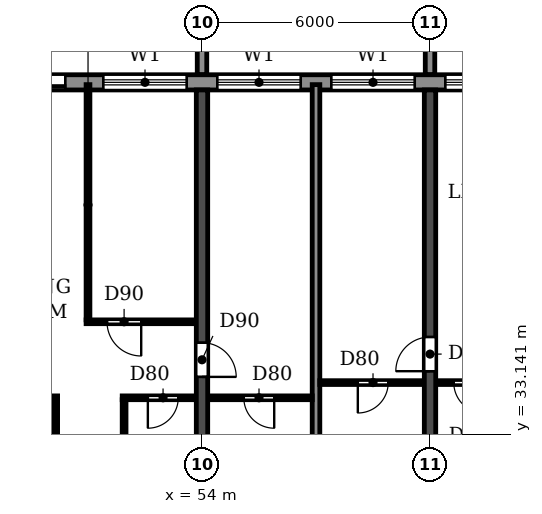
"""IFC4 building model, lengths in metres.
Left out: names, types, materials, properties, quantities, classifications, styles, units other than length and angle.
Written with IfcOpenShell. Run it as: python <this file> out.ifc"""

import sys

from ifc_helpers import new_model, si_unit, direction, frame, frame_2d, origin, place, context, subcontext, project, spatial, polyline, rectangle, outline, extrude, source, transform, mapped, element, fill, save


model = new_model("IFC4")
c1 = context("Model", 3, precision=1e-05, world=origin(), true_north=direction((0.0, 1.0)))
c2 = subcontext(c1, "Body", "Model", "MODEL_VIEW")
j1 = project(units=[si_unit("LENGTHUNIT", "METRE"), si_unit("PLANEANGLEUNIT", "RADIAN")], contexts=[c1])
p1 = place(None, origin())
s1 = spatial("IfcSite", under=j1, at=p1, CompositionType="ELEMENT")
p2 = place(p1, origin())
s2 = spatial("IfcBuilding", under=s1, at=p2, CompositionType="ELEMENT")
p3 = place(p2, frame((0.0, 0.0, 125.7)))
s3 = spatial("IfcBuildingStorey", under=s2, at=p3, CompositionType="ELEMENT", Elevation=125.7)
p4 = place(p3, frame((54.0, 30.525, 0.0), z_axis=(0.0, 0.0, 1.0), x_axis=(0.0, 1.0, 0.0)))
e1 = element("IfcWall", 1, at=p4, inside=s3, PredefinedType="SHEAR", context=c2, shape_type="SweptSolid", body=[
    extrude(rectangle(XDim=11.675, YDim=0.3, at=frame_2d((5.837, 0.0))), origin(), (0.0, 0.0, 1.0), 3.07),
])
p5 = place(p4, frame((4.125, 0.0, 0.0)))
e2 = element("IfcOpeningElement", 2, at=p5, cuts=e1, PredefinedType="OPENING", context=c2, shape_type="SweptSolid", body=[
    extrude(rectangle(XDim=0.9, YDim=2.1, at=frame_2d((0.45, 1.05))), frame((0.0, 0.16, 0.0), z_axis=(0.0, -1.0, 0.0), x_axis=(1.0, 0.0, 0.0)), (0.0, 0.0, 1.0), 0.32),
])
p6 = place(p3, frame((60.0, 30.525, 0.0), z_axis=(0.0, 0.0, 1.0), x_axis=(0.0, 1.0, 0.0)))
e3 = element("IfcWall", 3, at=p6, inside=s3, PredefinedType="SHEAR", context=c2, shape_type="SweptSolid", body=[
    extrude(rectangle(XDim=11.675, YDim=0.3, at=frame_2d((5.837, 0.0))), origin(), (0.0, 0.0, 1.0), 3.07),
])
p7 = place(p6, frame((4.275, 0.0, 0.0)))
e4 = element("IfcOpeningElement", 4, at=p7, cuts=e3, PredefinedType="OPENING", context=c2, shape_type="SweptSolid", body=[
    extrude(rectangle(XDim=0.9, YDim=2.1, at=frame_2d((0.45, 1.05))), frame((0.0, 0.16, 0.0), z_axis=(0.0, -1.0, 0.0), x_axis=(1.0, 0.0, 0.0)), (0.0, 0.0, 1.0), 0.32),
])
p8 = place(p3, frame((85.317, 42.4, 0.0), z_axis=(0.0, 0.0, 1.0), x_axis=(-1.0, 0.0, 0.0)))
e5 = element("IfcWall", 5, at=p8, inside=s3, PredefinedType="STANDARD", context=c2, shape_type="SweptSolid", body=[
    extrude(rectangle(XDim=68.634, YDim=0.4, at=frame_2d((34.317, 0.0))), origin(), (0.0, 0.0, 1.0), 3.07),
])
p9 = place(p8, frame((64.717, 0.0, 0.9)))
e6 = element("IfcOpeningElement", 6, at=p9, cuts=e5, PredefinedType="OPENING", context=c2, shape_type="SweptSolid", body=[
    extrude(rectangle(XDim=2.2, YDim=1.5, at=frame_2d((1.1, 0.75))), frame((0.0, 0.21, 0.0), z_axis=(0.0, -1.0, 0.0), x_axis=(1.0, 0.0, 0.0)), (0.0, 0.0, 1.0), 0.42),
])
p10 = place(p8, frame((61.917, 0.0, 0.0)))
e7 = element("IfcOpeningElement", 7, at=p10, cuts=e5, PredefinedType="OPENING", context=c2, shape_type="SweptSolid", body=[
    extrude(rectangle(XDim=1.8, YDim=2.4, at=frame_2d((0.9, 1.2))), frame((0.0, 0.21, 0.0), z_axis=(0.0, -1.0, 0.0), x_axis=(1.0, 0.0, 0.0)), (0.0, 0.0, 1.0), 0.42),
])
p11 = place(p8, frame((58.717, 0.0, 0.9)))
e8 = element("IfcOpeningElement", 8, at=p11, cuts=e5, PredefinedType="OPENING", context=c2, shape_type="SweptSolid", body=[
    extrude(rectangle(XDim=2.2, YDim=1.5, at=frame_2d((1.1, 0.75))), frame((0.0, 0.21, 0.0), z_axis=(0.0, -1.0, 0.0), x_axis=(1.0, 0.0, 0.0)), (0.0, 0.0, 1.0), 0.42),
])
p12 = place(p8, frame((55.917, 0.0, 0.0)))
e9 = element("IfcOpeningElement", 9, at=p12, cuts=e5, PredefinedType="OPENING", context=c2, shape_type="SweptSolid", body=[
    extrude(rectangle(XDim=1.8, YDim=2.4, at=frame_2d((0.9, 1.2))), frame((0.0, 0.21, 0.0), z_axis=(0.0, -1.0, 0.0), x_axis=(1.0, 0.0, 0.0)), (0.0, 0.0, 1.0), 0.42),
])
p13 = place(p8, frame((52.717, 0.0, 0.9)))
e10 = element("IfcOpeningElement", 10, at=p13, cuts=e5, PredefinedType="OPENING", context=c2, shape_type="SweptSolid", body=[
    extrude(rectangle(XDim=2.2, YDim=1.5, at=frame_2d((1.1, 0.75))), frame((0.0, 0.21, 0.0), z_axis=(0.0, -1.0, 0.0), x_axis=(1.0, 0.0, 0.0)), (0.0, 0.0, 1.0), 0.42),
])
p14 = place(p8, frame((49.917, 0.0, 0.0)))
e11 = element("IfcOpeningElement", 11, at=p14, cuts=e5, PredefinedType="OPENING", context=c2, shape_type="SweptSolid", body=[
    extrude(rectangle(XDim=1.8, YDim=2.4, at=frame_2d((0.9, 1.2))), frame((0.0, 0.21, 0.0), z_axis=(0.0, -1.0, 0.0), x_axis=(1.0, 0.0, 0.0)), (0.0, 0.0, 1.0), 0.42),
])
p15 = place(p8, frame((46.717, 0.0, 0.9)))
e12 = element("IfcOpeningElement", 12, at=p15, cuts=e5, PredefinedType="OPENING", context=c2, shape_type="SweptSolid", body=[
    extrude(rectangle(XDim=2.2, YDim=1.5, at=frame_2d((1.1, 0.75))), frame((0.0, 0.21, 0.0), z_axis=(0.0, -1.0, 0.0), x_axis=(1.0, 0.0, 0.0)), (0.0, 0.0, 1.0), 0.42),
])
p16 = place(p8, frame((43.917, 0.0, 0.0)))
e13 = element("IfcOpeningElement", 13, at=p16, cuts=e5, PredefinedType="OPENING", context=c2, shape_type="SweptSolid", body=[
    extrude(rectangle(XDim=1.8, YDim=2.4, at=frame_2d((0.9, 1.2))), frame((0.0, 0.21, 0.0), z_axis=(0.0, -1.0, 0.0), x_axis=(1.0, 0.0, 0.0)), (0.0, 0.0, 1.0), 0.42),
])
p17 = place(p8, frame((40.717, 0.0, 0.9)))
e14 = element("IfcOpeningElement", 14, at=p17, cuts=e5, PredefinedType="OPENING", context=c2, shape_type="SweptSolid", body=[
    extrude(rectangle(XDim=2.2, YDim=1.5, at=frame_2d((1.1, 0.75))), frame((0.0, 0.21, 0.0), z_axis=(0.0, -1.0, 0.0), x_axis=(1.0, 0.0, 0.0)), (0.0, 0.0, 1.0), 0.42),
])
p18 = place(p8, frame((37.717, 0.0, 0.9)))
e15 = element("IfcOpeningElement", 15, at=p18, cuts=e5, PredefinedType="OPENING", context=c2, shape_type="SweptSolid", body=[
    extrude(rectangle(XDim=2.2, YDim=1.5, at=frame_2d((1.1, 0.75))), frame((0.0, 0.21, 0.0), z_axis=(0.0, -1.0, 0.0), x_axis=(1.0, 0.0, 0.0)), (0.0, 0.0, 1.0), 0.42),
])
p19 = place(p8, frame((34.917, 0.0, 0.0)))
e16 = element("IfcOpeningElement", 16, at=p19, cuts=e5, PredefinedType="OPENING", context=c2, shape_type="SweptSolid", body=[
    extrude(rectangle(XDim=1.8, YDim=2.4, at=frame_2d((0.9, 1.2))), frame((0.0, 0.21, 0.0), z_axis=(0.0, -1.0, 0.0), x_axis=(1.0, 0.0, 0.0)), (0.0, 0.0, 1.0), 0.42),
])
p20 = place(p8, frame((31.717, 0.0, 0.9)))
e17 = element("IfcOpeningElement", 17, at=p20, cuts=e5, PredefinedType="OPENING", context=c2, shape_type="SweptSolid", body=[
    extrude(rectangle(XDim=2.2, YDim=1.5, at=frame_2d((1.1, 0.75))), frame((0.0, 0.21, 0.0), z_axis=(0.0, -1.0, 0.0), x_axis=(1.0, 0.0, 0.0)), (0.0, 0.0, 1.0), 0.42),
])
p21 = place(p8, frame((28.717, 0.0, 0.9)))
e18 = element("IfcOpeningElement", 18, at=p21, cuts=e5, PredefinedType="OPENING", context=c2, shape_type="SweptSolid", body=[
    extrude(rectangle(XDim=2.2, YDim=1.5, at=frame_2d((1.1, 0.75))), frame((0.0, 0.21, 0.0), z_axis=(0.0, -1.0, 0.0), x_axis=(1.0, 0.0, 0.0)), (0.0, 0.0, 1.0), 0.42),
])
p22 = place(p8, frame((25.717, 0.0, 0.9)))
e19 = element("IfcOpeningElement", 19, at=p22, cuts=e5, PredefinedType="OPENING", context=c2, shape_type="SweptSolid", body=[
    extrude(rectangle(XDim=2.2, YDim=1.5, at=frame_2d((1.1, 0.75))), frame((0.0, 0.21, 0.0), z_axis=(0.0, -1.0, 0.0), x_axis=(1.0, 0.0, 0.0)), (0.0, 0.0, 1.0), 0.42),
])
p23 = place(p8, frame((22.717, 0.0, 0.9)))
e20 = element("IfcOpeningElement", 20, at=p23, cuts=e5, PredefinedType="OPENING", context=c2, shape_type="SweptSolid", body=[
    extrude(rectangle(XDim=2.2, YDim=1.5, at=frame_2d((1.1, 0.75))), frame((0.0, 0.21, 0.0), z_axis=(0.0, -1.0, 0.0), x_axis=(1.0, 0.0, 0.0)), (0.0, 0.0, 1.0), 0.42),
])
p24 = place(p8, frame((19.917, 0.0, 0.0)))
e21 = element("IfcOpeningElement", 21, at=p24, cuts=e5, PredefinedType="OPENING", context=c2, shape_type="SweptSolid", body=[
    extrude(rectangle(XDim=1.8, YDim=2.4, at=frame_2d((0.9, 1.2))), frame((0.0, 0.21, 0.0), z_axis=(0.0, -1.0, 0.0), x_axis=(1.0, 0.0, 0.0)), (0.0, 0.0, 1.0), 0.42),
])
p25 = place(p8, frame((16.917, 0.0, 0.0)))
e22 = element("IfcOpeningElement", 22, at=p25, cuts=e5, PredefinedType="OPENING", context=c2, shape_type="SweptSolid", body=[
    extrude(rectangle(XDim=1.8, YDim=2.4, at=frame_2d((0.9, 1.2))), frame((0.0, 0.21, 0.0), z_axis=(0.0, -1.0, 0.0), x_axis=(1.0, 0.0, 0.0)), (0.0, 0.0, 1.0), 0.42),
])
p26 = place(p8, frame((13.717, 0.0, 0.9)))
e23 = element("IfcOpeningElement", 23, at=p26, cuts=e5, PredefinedType="OPENING", context=c2, shape_type="SweptSolid", body=[
    extrude(rectangle(XDim=2.2, YDim=1.5, at=frame_2d((1.1, 0.75))), frame((0.0, 0.21, 0.0), z_axis=(0.0, -1.0, 0.0), x_axis=(1.0, 0.0, 0.0)), (0.0, 0.0, 1.0), 0.42),
])
p27 = place(p8, frame((10.717, 0.0, 0.9)))
e24 = element("IfcOpeningElement", 24, at=p27, cuts=e5, PredefinedType="OPENING", context=c2, shape_type="SweptSolid", body=[
    extrude(rectangle(XDim=2.2, YDim=1.5, at=frame_2d((1.1, 0.75))), frame((0.0, 0.21, 0.0), z_axis=(0.0, -1.0, 0.0), x_axis=(1.0, 0.0, 0.0)), (0.0, 0.0, 1.0), 0.42),
])
p28 = place(p8, frame((7.717, 0.0, 0.9)))
e25 = element("IfcOpeningElement", 25, at=p28, cuts=e5, PredefinedType="OPENING", context=c2, shape_type="SweptSolid", body=[
    extrude(rectangle(XDim=2.2, YDim=1.5, at=frame_2d((1.1, 0.75))), frame((0.0, 0.21, 0.0), z_axis=(0.0, -1.0, 0.0), x_axis=(1.0, 0.0, 0.0)), (0.0, 0.0, 1.0), 0.42),
])
p29 = place(p8, frame((4.917, 0.0, 0.0)))
e26 = element("IfcOpeningElement", 26, at=p29, cuts=e5, PredefinedType="OPENING", context=c2, shape_type="SweptSolid", body=[
    extrude(rectangle(XDim=1.8, YDim=2.4, at=frame_2d((0.9, 1.2))), frame((0.0, 0.21, 0.0), z_axis=(0.0, -1.0, 0.0), x_axis=(1.0, 0.0, 0.0)), (0.0, 0.0, 1.0), 0.42),
])
p30 = place(p8, frame((1.717, 0.0, 0.9)))
e27 = element("IfcOpeningElement", 27, at=p30, cuts=e5, PredefinedType="OPENING", context=c2, shape_type="SweptSolid", body=[
    extrude(rectangle(XDim=2.2, YDim=1.5, at=frame_2d((1.1, 0.75))), frame((0.0, 0.21, 0.0), z_axis=(0.0, -1.0, 0.0), x_axis=(1.0, 0.0, 0.0)), (0.0, 0.0, 1.0), 0.42),
])
m1 = source(origin(), c2, "Body", "SweptSolid", [
    extrude(outline(polyline([(0.0, 0.0), (0.25, 0.0), (0.25, 3.1), (0.0, 3.1), (0.0, 0.0)])), origin(), (0.0, 0.0, 1.0), 3.1),
])
for number, where in (
    (28, (53.875, 42.6, 0.0)),
    (29, (59.875, 42.6, 0.0)),
):
    element("IfcWall", number, at=place(p3, frame(where)), inside=s3, PredefinedType="STANDARD", context=c2, shape_type="MappedRepresentation", body=[
        mapped(m1, transform((0.0, 0.0, 0.0))),
    ])
p31 = place(p3, frame((57.0, 30.535, 0.0), z_axis=(0.0, 0.0, 1.0), x_axis=(0.0, 1.0, 0.0)))
e30 = element("IfcWall", 30, at=p31, inside=s3, PredefinedType="PARTITIONING", context=c2, shape_type="SweptSolid", body=[
    extrude(rectangle(XDim=11.805, YDim=0.2, at=frame_2d((5.903, 0.0))), origin(), (0.0, 0.0, 1.0), 3.07),
])
p32 = place(p3, frame((48.16, 34.1, 0.0), z_axis=(0.0, 0.0, 1.0), x_axis=(1.0, 0.0, 0.0)))
e31 = element("IfcWall", 31, at=p32, inside=s3, PredefinedType="PARTITIONING", context=c2, shape_type="SweptSolid", body=[
    extrude(rectangle(XDim=2.04, YDim=0.1, at=frame_2d((1.02, 0.0))), origin(), (0.0, 0.0, 1.0), 3.07),
])
p33 = place(p32, frame((0.465, 0.0, 0.0)))
e32 = element("IfcOpeningElement", 32, at=p33, cuts=e31, PredefinedType="OPENING", context=c2, shape_type="SweptSolid", body=[
    extrude(rectangle(XDim=0.9, YDim=2.1, at=frame_2d((0.45, 1.05))), frame((0.0, 0.06, 0.0), z_axis=(0.0, -1.0, 0.0), x_axis=(1.0, 0.0, 0.0)), (0.0, 0.0, 1.0), 0.12),
])
p34 = place(p3, frame((51.9, 34.1, 0.0), z_axis=(0.0, 0.0, 1.0), x_axis=(1.0, 0.0, 0.0)))
e33 = element("IfcWall", 33, at=p34, inside=s3, PredefinedType="PARTITIONING", context=c2, shape_type="SweptSolid", body=[
    extrude(rectangle(XDim=1.94, YDim=0.1, at=frame_2d((0.97, 0.0))), origin(), (0.0, 0.0, 1.0), 3.07),
])
p35 = place(p34, frame((0.675, 0.0, 0.0)))
e34 = element("IfcOpeningElement", 34, at=p35, cuts=e33, PredefinedType="OPENING", context=c2, shape_type="SweptSolid", body=[
    extrude(rectangle(XDim=0.8, YDim=2.1, at=frame_2d((0.4, 1.05))), frame((0.0, 0.06, 0.0), z_axis=(0.0, -1.0, 0.0), x_axis=(1.0, 0.0, 0.0)), (0.0, 0.0, 1.0), 0.12),
])
p36 = place(p3, frame((54.16, 34.1, 0.0), z_axis=(0.0, 0.0, 1.0), x_axis=(1.0, 0.0, 0.0)))
e35 = element("IfcWall", 35, at=p36, inside=s3, PredefinedType="PARTITIONING", context=c2, shape_type="SweptSolid", body=[
    extrude(rectangle(XDim=2.74, YDim=0.1, at=frame_2d((1.37, 0.0))), origin(), (0.0, 0.0, 1.0), 3.07),
])
p37 = place(p36, frame((0.94, 0.0, 0.0)))
e36 = element("IfcOpeningElement", 36, at=p37, cuts=e35, PredefinedType="OPENING", context=c2, shape_type="SweptSolid", body=[
    extrude(rectangle(XDim=0.8, YDim=2.1, at=frame_2d((0.4, 1.05))), frame((0.0, 0.06, 0.0), z_axis=(0.0, -1.0, 0.0), x_axis=(1.0, 0.0, 0.0)), (0.0, 0.0, 1.0), 0.12),
])
p38 = place(p3, frame((57.1, 34.5, 0.0), z_axis=(0.0, 0.0, 1.0), x_axis=(1.0, 0.0, 0.0)))
e37 = element("IfcWall", 37, at=p38, inside=s3, PredefinedType="PARTITIONING", context=c2, shape_type="SweptSolid", body=[
    extrude(rectangle(XDim=2.74, YDim=0.1, at=frame_2d((1.37, 0.0))), origin(), (0.0, 0.0, 1.0), 3.07),
])
p39 = place(p38, frame((1.0, 0.0, 0.0)))
e38 = element("IfcOpeningElement", 38, at=p39, cuts=e37, PredefinedType="OPENING", context=c2, shape_type="SweptSolid", body=[
    extrude(rectangle(XDim=0.8, YDim=2.1, at=frame_2d((0.4, 1.05))), frame((0.0, 0.06, 0.0), z_axis=(0.0, -1.0, 0.0), x_axis=(1.0, 0.0, 0.0)), (0.0, 0.0, 1.0), 0.12),
])
p40 = place(p3, frame((60.16, 34.5, 0.0), z_axis=(0.0, 0.0, 1.0), x_axis=(1.0, 0.0, 0.0)))
e39 = element("IfcWall", 39, at=p40, inside=s3, PredefinedType="PARTITIONING", context=c2, shape_type="SweptSolid", body=[
    extrude(rectangle(XDim=1.94, YDim=0.1, at=frame_2d((0.97, 0.0))), origin(), (0.0, 0.0, 1.0), 3.07),
])
p41 = place(p40, frame((0.465, 0.0, 0.0)))
e40 = element("IfcOpeningElement", 40, at=p41, cuts=e39, PredefinedType="OPENING", context=c2, shape_type="SweptSolid", body=[
    extrude(rectangle(XDim=0.8, YDim=2.1, at=frame_2d((0.4, 1.05))), frame((0.0, 0.06, 0.0), z_axis=(0.0, -1.0, 0.0), x_axis=(1.0, 0.0, 0.0)), (0.0, 0.0, 1.0), 0.12),
])
p42 = place(p3, frame((50.95, 36.1, 0.0), z_axis=(0.0, 0.0, 1.0), x_axis=(1.0, 0.0, 0.0)))
e41 = element("IfcWall", 41, at=p42, inside=s3, PredefinedType="PARTITIONING", context=c2, shape_type="SweptSolid", body=[
    extrude(rectangle(XDim=2.89, YDim=0.1, at=frame_2d((1.445, 0.0))), origin(), (0.0, 0.0, 1.0), 3.07),
])
p43 = place(p42, frame((0.55, 0.0, 0.0)))
e42 = element("IfcOpeningElement", 42, at=p43, cuts=e41, PredefinedType="OPENING", context=c2, shape_type="SweptSolid", body=[
    extrude(rectangle(XDim=0.9, YDim=2.1, at=frame_2d((0.45, 1.05))), frame((0.0, 0.06, 0.0), z_axis=(0.0, -1.0, 0.0), x_axis=(1.0, 0.0, 0.0)), (0.0, 0.0, 1.0), 0.12),
])
p44 = place(p3, frame((50.15, 30.535, 0.0), z_axis=(0.0, 0.0, 1.0), x_axis=(0.0, 1.0, 0.0)))
e43 = element("IfcWall", 43, at=p44, inside=s3, PredefinedType="PARTITIONING", context=c2, shape_type="SweptSolid", body=[
    extrude(rectangle(XDim=3.515, YDim=0.1, at=frame_2d((1.758, 0.0))), origin(), (0.0, 0.0, 1.0), 3.07),
])
p45 = place(p3, frame((51.0, 36.15, 0.0), z_axis=(0.0, 0.0, 1.0), x_axis=(0.0, 1.0, 0.0)))
e44 = element("IfcWall", 44, at=p45, inside=s3, PredefinedType="PARTITIONING", context=c2, shape_type="SweptSolid", body=[
    extrude(rectangle(XDim=6.19, YDim=0.1, at=frame_2d((3.095, 0.0))), origin(), (0.0, 0.0, 1.0), 3.07),
])
p46 = place(p3, frame((51.95, 30.535, 0.0), z_axis=(0.0, 0.0, 1.0), x_axis=(0.0, 1.0, 0.0)))
e45 = element("IfcWall", 45, at=p46, inside=s3, PredefinedType="PARTITIONING", context=c2, shape_type="SweptSolid", body=[
    extrude(rectangle(XDim=3.515, YDim=0.1, at=frame_2d((1.758, 0.0))), origin(), (0.0, 0.0, 1.0), 3.07),
])
p47 = place(p19, origin())
e46 = element("IfcDoor", 46, at=p47, inside=s3, OperationType="DOUBLE_DOOR_SLIDING", PredefinedType="DOOR", context=c2, shape_type="SweptSolid", body=[
    extrude(rectangle(XDim=1.8, YDim=2.4, at=frame_2d((0.9, 1.2))), frame((0.0, 0.025, 0.0), z_axis=(0.0, -1.0, 0.0), x_axis=(1.0, 0.0, 0.0)), (0.0, 0.0, 1.0), 0.05),
])
fill(e16, e46)
p48 = place(p20, origin())
e47 = element("IfcWindow", 47, at=p48, inside=s3, PartitioningType="DOUBLE_PANEL_HORIZONTAL", PredefinedType="WINDOW", context=c2, shape_type="SweptSolid", body=[
    extrude(rectangle(XDim=2.2, YDim=1.5, at=frame_2d((1.1, 0.75))), frame((0.0, 0.03, 0.0), z_axis=(0.0, -1.0, 0.0), x_axis=(1.0, 0.0, 0.0)), (0.0, 0.0, 1.0), 0.06),
])
fill(e17, e47)
p49 = place(p21, origin())
e48 = element("IfcWindow", 48, at=p49, inside=s3, PartitioningType="DOUBLE_PANEL_HORIZONTAL", PredefinedType="WINDOW", context=c2, shape_type="SweptSolid", body=[
    extrude(rectangle(XDim=2.2, YDim=1.5, at=frame_2d((1.1, 0.75))), frame((0.0, 0.03, 0.0), z_axis=(0.0, -1.0, 0.0), x_axis=(1.0, 0.0, 0.0)), (0.0, 0.0, 1.0), 0.06),
])
fill(e18, e48)
p50 = place(p22, origin())
e49 = element("IfcWindow", 49, at=p50, inside=s3, PartitioningType="DOUBLE_PANEL_HORIZONTAL", PredefinedType="WINDOW", context=c2, shape_type="SweptSolid", body=[
    extrude(rectangle(XDim=2.2, YDim=1.5, at=frame_2d((1.1, 0.75))), frame((0.0, 0.03, 0.0), z_axis=(0.0, -1.0, 0.0), x_axis=(1.0, 0.0, 0.0)), (0.0, 0.0, 1.0), 0.06),
])
fill(e19, e49)
p51 = place(p23, origin())
e50 = element("IfcWindow", 50, at=p51, inside=s3, PartitioningType="DOUBLE_PANEL_HORIZONTAL", PredefinedType="WINDOW", context=c2, shape_type="SweptSolid", body=[
    extrude(rectangle(XDim=2.2, YDim=1.5, at=frame_2d((1.1, 0.75))), frame((0.0, 0.03, 0.0), z_axis=(0.0, -1.0, 0.0), x_axis=(1.0, 0.0, 0.0)), (0.0, 0.0, 1.0), 0.06),
])
fill(e20, e50)
p52 = place(p37, frame((0.8, 0.0, 0.0), z_axis=(0.0, 0.0, 1.0), x_axis=(-1.0, 0.0, 0.0)))
e51 = element("IfcDoor", 51, at=p52, inside=s3, OperationType="SINGLE_SWING_LEFT", PredefinedType="DOOR", context=c2, shape_type="SweptSolid", body=[
    extrude(rectangle(XDim=0.8, YDim=2.1, at=frame_2d((0.4, 1.05))), frame((0.0, 0.025, 0.0), z_axis=(0.0, -1.0, 0.0), x_axis=(1.0, 0.0, 0.0)), (0.0, 0.0, 1.0), 0.05),
])
fill(e36, e51)
p53 = place(p43, frame((0.9, 0.0, 0.0), z_axis=(0.0, 0.0, 1.0), x_axis=(-1.0, 0.0, 0.0)))
e52 = element("IfcDoor", 52, at=p53, inside=s3, OperationType="SINGLE_SWING_LEFT", PredefinedType="DOOR", context=c2, shape_type="SweptSolid", body=[
    extrude(rectangle(XDim=0.9, YDim=2.1, at=frame_2d((0.45, 1.05))), frame((0.0, 0.025, 0.0), z_axis=(0.0, -1.0, 0.0), x_axis=(1.0, 0.0, 0.0)), (0.0, 0.0, 1.0), 0.05),
])
fill(e42, e52)
p54 = place(p35, frame((0.8, 0.0, 0.0), z_axis=(0.0, 0.0, 1.0), x_axis=(-1.0, 0.0, 0.0)))
e53 = element("IfcDoor", 53, at=p54, inside=s3, OperationType="SINGLE_SWING_RIGHT", PredefinedType="DOOR", context=c2, shape_type="SweptSolid", body=[
    extrude(rectangle(XDim=0.8, YDim=2.1, at=frame_2d((0.4, 1.05))), frame((0.0, 0.025, 0.0), z_axis=(0.0, -1.0, 0.0), x_axis=(1.0, 0.0, 0.0)), (0.0, 0.0, 1.0), 0.05),
])
fill(e34, e53)
p55 = place(p5, frame((0.9, 0.0, 0.0), z_axis=(0.0, 0.0, 1.0), x_axis=(-1.0, 0.0, 0.0)))
e54 = element("IfcDoor", 54, at=p55, inside=s3, OperationType="SINGLE_SWING_RIGHT", PredefinedType="DOOR", context=c2, shape_type="SweptSolid", body=[
    extrude(rectangle(XDim=0.9, YDim=2.1, at=frame_2d((0.45, 1.05))), frame((0.0, 0.025, 0.0), z_axis=(0.0, -1.0, 0.0), x_axis=(1.0, 0.0, 0.0)), (0.0, 0.0, 1.0), 0.05),
])
fill(e2, e54)
p56 = place(p39, frame((0.8, 0.0, 0.0), z_axis=(0.0, 0.0, 1.0), x_axis=(-1.0, 0.0, 0.0)))
e55 = element("IfcDoor", 55, at=p56, inside=s3, OperationType="SINGLE_SWING_RIGHT", PredefinedType="DOOR", context=c2, shape_type="SweptSolid", body=[
    extrude(rectangle(XDim=0.8, YDim=2.1, at=frame_2d((0.4, 1.05))), frame((0.0, 0.025, 0.0), z_axis=(0.0, -1.0, 0.0), x_axis=(1.0, 0.0, 0.0)), (0.0, 0.0, 1.0), 0.05),
])
fill(e38, e55)
p57 = place(p7, origin())
e56 = element("IfcDoor", 56, at=p57, inside=s3, OperationType="SINGLE_SWING_LEFT", PredefinedType="DOOR", context=c2, shape_type="SweptSolid", body=[
    extrude(rectangle(XDim=0.9, YDim=2.1, at=frame_2d((0.45, 1.05))), frame((0.0, 0.025, 0.0), z_axis=(0.0, -1.0, 0.0), x_axis=(1.0, 0.0, 0.0)), (0.0, 0.0, 1.0), 0.05),
])
fill(e4, e56)
p58 = place(p41, frame((0.8, 0.0, 0.0), z_axis=(0.0, 0.0, 1.0), x_axis=(-1.0, 0.0, 0.0)))
e57 = element("IfcDoor", 57, at=p58, inside=s3, OperationType="SINGLE_SWING_LEFT", PredefinedType="DOOR", context=c2, shape_type="SweptSolid", body=[
    extrude(rectangle(XDim=0.8, YDim=2.1, at=frame_2d((0.4, 1.05))), frame((0.0, 0.025, 0.0), z_axis=(0.0, -1.0, 0.0), x_axis=(1.0, 0.0, 0.0)), (0.0, 0.0, 1.0), 0.05),
])
fill(e40, e57)
save(model, sys.argv[1])
